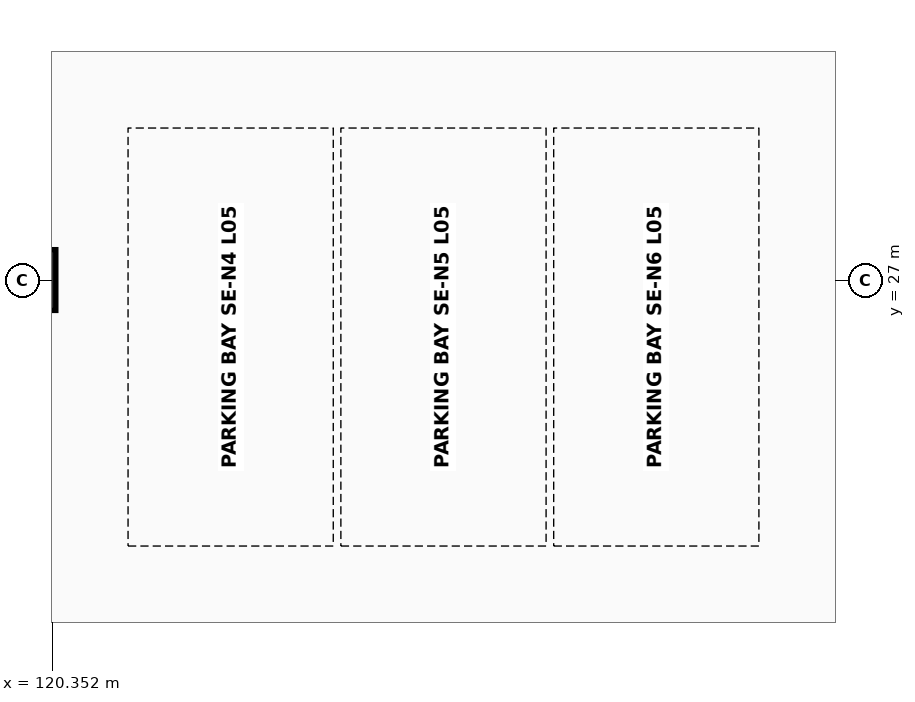
"""IFC4 building model, lengths in metres.
Left out: names, types, materials, properties, quantities, classifications, styles, units other than length and angle.
Written with IfcOpenShell. Run it as: python <this file> out.ifc"""

import sys

from ifc_helpers import new_model, si_unit, direction, frame, origin, origin_2d, place, context, subcontext, project, spatial, rectangle, extrude, element, save


model = new_model("IFC4")
c1 = context("Model", 3, precision=1e-05, world=origin(), true_north=direction((0.0, 1.0)))
c2 = subcontext(c1, "Body", "Model", "MODEL_VIEW")
j1 = project(units=[si_unit("LENGTHUNIT", "METRE"), si_unit("PLANEANGLEUNIT", "RADIAN")], contexts=[c1])
p1 = place(None, origin())
s1 = spatial("IfcSite", under=j1, at=p1, CompositionType="ELEMENT")
p2 = place(p1, origin())
s2 = spatial("IfcBuilding", under=s1, at=p2, CompositionType="ELEMENT")
p3 = place(p2, frame((0.0, 0.0, 21.0)))
s3 = spatial("IfcBuildingStorey", under=s2, at=p3, CompositionType="ELEMENT", Elevation=21.0)
p4 = place(p3, frame((120.0, 27.0, 0.0), z_axis=(0.0, 0.0, 1.0), x_axis=(1.0, 0.0, 0.0)))
e1 = element("IfcColumn", 1, at=p4, inside=s3, PredefinedType="COLUMN", context=c2, shape_type="SweptSolid", body=[
    extrude(rectangle(XDim=0.8, YDim=0.8, at=origin_2d()), origin(), (0.0, 0.0, 1.0), 3.8),
])
save(model, sys.argv[1])
